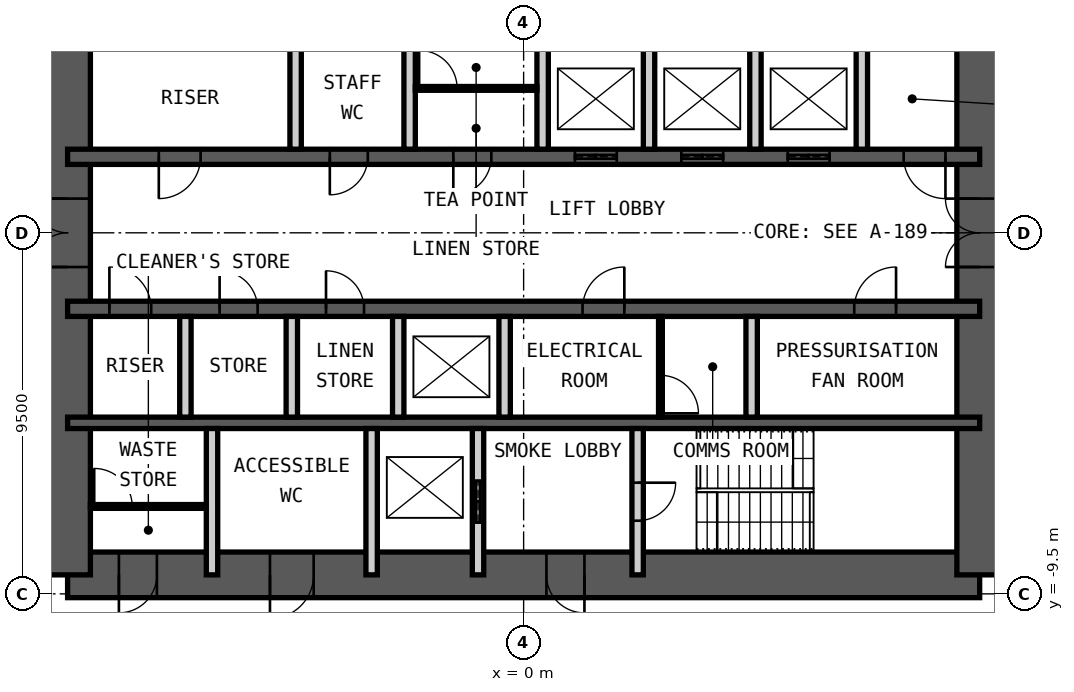
"""IFC4 building model, lengths in metres.
Left out: names, types, materials, properties, quantities, classifications, styles, units other than length and angle.
Written with IfcOpenShell. Run it as: python <this file> out.ifc"""

import sys

from ifc_helpers import new_model, si_unit, direction, frame, frame_2d, origin, place, context, subcontext, project, spatial, rectangle, extrude, element, fill, save


model = new_model("IFC4")
c1 = context("Model", 3, precision=1e-05, world=origin(), true_north=direction((0.0, 1.0)))
c2 = subcontext(c1, "Body", "Model", "MODEL_VIEW")
j1 = project(units=[si_unit("LENGTHUNIT", "METRE"), si_unit("PLANEANGLEUNIT", "RADIAN")], contexts=[c1])
p1 = place(None, origin())
s1 = spatial("IfcSite", under=j1, at=p1, CompositionType="ELEMENT")
p2 = place(p1, origin())
s2 = spatial("IfcBuilding", under=s1, at=p2, CompositionType="ELEMENT")
p3 = place(p2, frame((0.0, 0.0, 226.6)))
s3 = spatial("IfcBuildingStorey", under=s2, at=p3, CompositionType="ELEMENT", Elevation=226.6)
p4 = place(p3, frame((-12.0, -9.0, 0.0), z_axis=(0.0, 0.0, 1.0), x_axis=(1.0, 0.0, 0.0)))
e1 = element("IfcWall", 1, at=p4, inside=s3, PredefinedType="SHEAR", context=c2, shape_type="SweptSolid", body=[
    extrude(rectangle(XDim=24.0, YDim=1.2, at=frame_2d((12.0, 0.0))), origin(), (0.0, 0.0, 1.0), 4.2),
])
p5 = place(p4, frame((1.35, 0.0, 0.0)))
e2 = element("IfcOpeningElement", 2, at=p5, cuts=e1, PredefinedType="OPENING", context=c2, shape_type="SweptSolid", body=[
    extrude(rectangle(XDim=1.0, YDim=2.1, at=frame_2d((0.5, 1.05))), frame((0.0, 0.61, 0.0), z_axis=(0.0, -1.0, 0.0), x_axis=(1.0, 0.0, 0.0)), (0.0, 0.0, 1.0), 1.22),
])
p6 = place(p4, frame((5.325, 0.0, 0.0)))
e3 = element("IfcOpeningElement", 3, at=p6, cuts=e1, PredefinedType="OPENING", context=c2, shape_type="SweptSolid", body=[
    extrude(rectangle(XDim=1.15, YDim=2.1, at=frame_2d((0.575, 1.05))), frame((0.0, 0.61, 0.0), z_axis=(0.0, -1.0, 0.0), x_axis=(1.0, 0.0, 0.0)), (0.0, 0.0, 1.0), 1.22),
])
p7 = place(p4, frame((12.6, 0.0, 0.0)))
e4 = element("IfcOpeningElement", 4, at=p7, cuts=e1, PredefinedType="OPENING", context=c2, shape_type="SweptSolid", body=[
    extrude(rectangle(XDim=1.0, YDim=2.1, at=frame_2d((0.5, 1.05))), frame((0.0, 0.61, 0.0), z_axis=(0.0, -1.0, 0.0), x_axis=(1.0, 0.0, 0.0)), (0.0, 0.0, 1.0), 1.22),
])
p8 = place(p3, frame((12.0, -9.0, 0.0), z_axis=(0.0, 0.0, 1.0), x_axis=(0.0, 1.0, 0.0)))
e5 = element("IfcWall", 5, at=p8, inside=s3, PredefinedType="SHEAR", context=c2, shape_type="SweptSolid", body=[
    extrude(rectangle(XDim=18.0, YDim=1.2, at=frame_2d((9.0, 0.0))), origin(), (0.0, 0.0, 1.0), 4.2),
])
p9 = place(p8, frame((8.1, 0.0, 0.0)))
e6 = element("IfcOpeningElement", 6, at=p9, cuts=e5, PredefinedType="OPENING", context=c2, shape_type="SweptSolid", body=[
    extrude(rectangle(XDim=1.8, YDim=2.1, at=frame_2d((0.9, 1.05))), frame((0.0, 0.61, 0.0), z_axis=(0.0, -1.0, 0.0), x_axis=(1.0, 0.0, 0.0)), (0.0, 0.0, 1.0), 1.22),
])
p10 = place(p3, frame((-12.0, -9.0, 0.0), z_axis=(0.0, 0.0, 1.0), x_axis=(0.0, 1.0, 0.0)))
e7 = element("IfcWall", 7, at=p10, inside=s3, PredefinedType="SHEAR", context=c2, shape_type="SweptSolid", body=[
    extrude(rectangle(XDim=18.0, YDim=1.2, at=frame_2d((9.0, 0.0))), origin(), (0.0, 0.0, 1.0), 4.2),
])
p11 = place(p10, frame((8.1, 0.0, 0.0)))
e8 = element("IfcOpeningElement", 8, at=p11, cuts=e7, PredefinedType="OPENING", context=c2, shape_type="SweptSolid", body=[
    extrude(rectangle(XDim=1.8, YDim=2.1, at=frame_2d((0.9, 1.05))), frame((0.0, 0.61, 0.0), z_axis=(0.0, -1.0, 0.0), x_axis=(1.0, 0.0, 0.0)), (0.0, 0.0, 1.0), 1.22),
])
p12 = place(p3, frame((-12.0, 2.0, 0.0), z_axis=(0.0, 0.0, 1.0), x_axis=(1.0, 0.0, 0.0)))
e9 = element("IfcWall", 9, at=p12, inside=s3, PredefinedType="SHEAR", context=c2, shape_type="SweptSolid", body=[
    extrude(rectangle(XDim=24.0, YDim=0.4, at=frame_2d((12.0, 0.0))), origin(), (0.0, 0.0, 1.0), 4.2),
])
p13 = place(p12, frame((2.4, 0.0, 0.0)))
e10 = element("IfcOpeningElement", 10, at=p13, cuts=e9, PredefinedType="OPENING", context=c2, shape_type="SweptSolid", body=[
    extrude(rectangle(XDim=1.1, YDim=2.1, at=frame_2d((0.55, 1.05))), frame((0.0, 0.21, 0.0), z_axis=(0.0, -1.0, 0.0), x_axis=(1.0, 0.0, 0.0)), (0.0, 0.0, 1.0), 0.42),
])
p14 = place(p12, frame((22.0, 0.0, 0.0)))
e11 = element("IfcOpeningElement", 11, at=p14, cuts=e9, PredefinedType="OPENING", context=c2, shape_type="SweptSolid", body=[
    extrude(rectangle(XDim=1.1, YDim=2.1, at=frame_2d((0.55, 1.05))), frame((0.0, 0.21, 0.0), z_axis=(0.0, -1.0, 0.0), x_axis=(1.0, 0.0, 0.0)), (0.0, 0.0, 1.0), 0.42),
])
p15 = place(p12, frame((10.15, 0.0, 0.0)))
e12 = element("IfcOpeningElement", 12, at=p15, cuts=e9, PredefinedType="OPENING", context=c2, shape_type="SweptSolid", body=[
    extrude(rectangle(XDim=1.0, YDim=2.1, at=frame_2d((0.5, 1.05))), frame((0.0, 0.21, 0.0), z_axis=(0.0, -1.0, 0.0), x_axis=(1.0, 0.0, 0.0)), (0.0, 0.0, 1.0), 0.42),
])
p16 = place(p12, frame((6.9, 0.0, 0.0)))
e13 = element("IfcOpeningElement", 13, at=p16, cuts=e9, PredefinedType="OPENING", context=c2, shape_type="SweptSolid", body=[
    extrude(rectangle(XDim=1.0, YDim=2.1, at=frame_2d((0.5, 1.05))), frame((0.0, 0.21, 0.0), z_axis=(0.0, -1.0, 0.0), x_axis=(1.0, 0.0, 0.0)), (0.0, 0.0, 1.0), 0.42),
])
p17 = place(p12, frame((13.35, 0.0, 0.0)))
e14 = element("IfcOpeningElement", 14, at=p17, cuts=e9, PredefinedType="OPENING", context=c2, shape_type="SweptSolid", body=[
    extrude(rectangle(XDim=1.1, YDim=2.4, at=frame_2d((0.55, 1.2))), frame((0.0, 0.21, 0.0), z_axis=(0.0, -1.0, 0.0), x_axis=(1.0, 0.0, 0.0)), (0.0, 0.0, 1.0), 0.42),
])
p18 = place(p12, frame((16.15, 0.0, 0.0)))
e15 = element("IfcOpeningElement", 15, at=p18, cuts=e9, PredefinedType="OPENING", context=c2, shape_type="SweptSolid", body=[
    extrude(rectangle(XDim=1.1, YDim=2.4, at=frame_2d((0.55, 1.2))), frame((0.0, 0.21, 0.0), z_axis=(0.0, -1.0, 0.0), x_axis=(1.0, 0.0, 0.0)), (0.0, 0.0, 1.0), 0.42),
])
p19 = place(p12, frame((18.95, 0.0, 0.0)))
e16 = element("IfcOpeningElement", 16, at=p19, cuts=e9, PredefinedType="OPENING", context=c2, shape_type="SweptSolid", body=[
    extrude(rectangle(XDim=1.1, YDim=2.4, at=frame_2d((0.55, 1.2))), frame((0.0, 0.21, 0.0), z_axis=(0.0, -1.0, 0.0), x_axis=(1.0, 0.0, 0.0)), (0.0, 0.0, 1.0), 0.42),
])
p20 = place(p3, frame((-12.0, -2.0, 0.0), z_axis=(0.0, 0.0, 1.0), x_axis=(1.0, 0.0, 0.0)))
e17 = element("IfcWall", 17, at=p20, inside=s3, PredefinedType="SHEAR", context=c2, shape_type="SweptSolid", body=[
    extrude(rectangle(XDim=24.0, YDim=0.4, at=frame_2d((12.0, 0.0))), origin(), (0.0, 0.0, 1.0), 4.2),
])
p21 = place(p20, frame((1.1, 0.0, 0.0)))
e18 = element("IfcOpeningElement", 18, at=p21, cuts=e17, PredefinedType="OPENING", context=c2, shape_type="SweptSolid", body=[
    extrude(rectangle(XDim=1.1, YDim=2.1, at=frame_2d((0.55, 1.05))), frame((0.0, 0.21, 0.0), z_axis=(0.0, -1.0, 0.0), x_axis=(1.0, 0.0, 0.0)), (0.0, 0.0, 1.0), 0.42),
])
p22 = place(p20, frame((13.55, 0.0, 0.0)))
e19 = element("IfcOpeningElement", 19, at=p22, cuts=e17, PredefinedType="OPENING", context=c2, shape_type="SweptSolid", body=[
    extrude(rectangle(XDim=1.1, YDim=2.1, at=frame_2d((0.55, 1.05))), frame((0.0, 0.21, 0.0), z_axis=(0.0, -1.0, 0.0), x_axis=(1.0, 0.0, 0.0)), (0.0, 0.0, 1.0), 0.42),
])
p23 = place(p20, frame((20.7, 0.0, 0.0)))
e20 = element("IfcOpeningElement", 20, at=p23, cuts=e17, PredefinedType="OPENING", context=c2, shape_type="SweptSolid", body=[
    extrude(rectangle(XDim=1.1, YDim=2.1, at=frame_2d((0.55, 1.05))), frame((0.0, 0.21, 0.0), z_axis=(0.0, -1.0, 0.0), x_axis=(1.0, 0.0, 0.0)), (0.0, 0.0, 1.0), 0.42),
])
p24 = place(p20, frame((4.0, 0.0, 0.0)))
e21 = element("IfcOpeningElement", 21, at=p24, cuts=e17, PredefinedType="OPENING", context=c2, shape_type="SweptSolid", body=[
    extrude(rectangle(XDim=1.0, YDim=2.1, at=frame_2d((0.5, 1.05))), frame((0.0, 0.21, 0.0), z_axis=(0.0, -1.0, 0.0), x_axis=(1.0, 0.0, 0.0)), (0.0, 0.0, 1.0), 0.42),
])
p25 = place(p20, frame((6.8, 0.0, 0.0)))
e22 = element("IfcOpeningElement", 22, at=p25, cuts=e17, PredefinedType="OPENING", context=c2, shape_type="SweptSolid", body=[
    extrude(rectangle(XDim=1.0, YDim=2.1, at=frame_2d((0.5, 1.05))), frame((0.0, 0.21, 0.0), z_axis=(0.0, -1.0, 0.0), x_axis=(1.0, 0.0, 0.0)), (0.0, 0.0, 1.0), 0.42),
])
p26 = place(p3, frame((-12.0, -5.0, 0.0), z_axis=(0.0, 0.0, 1.0), x_axis=(1.0, 0.0, 0.0)))
e23 = element("IfcWall", 23, at=p26, inside=s3, PredefinedType="SHEAR", context=c2, shape_type="SweptSolid", body=[
    extrude(rectangle(XDim=24.0, YDim=0.3, at=frame_2d((12.0, 0.0))), origin(), (0.0, 0.0, 1.0), 4.2),
])
for number, where, z_axis, x_axis in (
    (24, (-6.0, 2.2, 0.0), (0.0, 0.0, 1.0), (0.0, 1.0, 0.0)),
    (25, (-3.0, 2.2, 0.0), (0.0, 0.0, 1.0), (0.0, 1.0, 0.0)),
    (26, (0.5, 2.2, 0.0), (0.0, 0.0, 1.0), (0.0, 1.0, 0.0)),
    (27, (3.3, 2.2, 0.0), (0.0, 0.0, 1.0), (0.0, 1.0, 0.0)),
    (28, (6.1, 2.2, 0.0), (0.0, 0.0, 1.0), (0.0, 1.0, 0.0)),
    (29, (8.9, 2.2, 0.0), (0.0, 0.0, 1.0), (0.0, 1.0, 0.0)),
    (30, (-8.9, -4.85, 0.0), (0.0, 0.0, 1.0), (0.0, 1.0, 0.0)),
    (31, (-6.1, -4.85, 0.0), (0.0, 0.0, 1.0), (0.0, 1.0, 0.0)),
    (32, (-3.3, -4.85, 0.0), (0.0, 0.0, 1.0), (0.0, 1.0, 0.0)),
    (33, (-0.5, -4.85, 0.0), (0.0, 0.0, 1.0), (0.0, 1.0, 0.0)),
    (34, (6.0, -4.85, 0.0), (0.0, 0.0, 1.0), (0.0, 1.0, 0.0)),
):
    element("IfcWall", number, at=place(p3, frame(where, z_axis=z_axis, x_axis=x_axis)), inside=s3, PredefinedType="PARTITIONING", context=c2, shape_type="SweptSolid", body=[
        extrude(rectangle(XDim=2.65, YDim=0.3, at=frame_2d((1.325, 0.0))), origin(), (0.0, 0.0, 1.0), 3.98),
    ])
for number, where, z_axis, x_axis in (
    (35, (-8.2, -9.0, 0.0), (0.0, 0.0, 1.0), (0.0, 1.0, 0.0)),
    (36, (-4.0, -9.0, 0.0), (0.0, 0.0, 1.0), (0.0, 1.0, 0.0)),
):
    element("IfcWall", number, at=place(p3, frame(where, z_axis=z_axis, x_axis=x_axis)), inside=s3, PredefinedType="PARTITIONING", context=c2, shape_type="SweptSolid", body=[
        extrude(rectangle(XDim=3.85, YDim=0.3, at=frame_2d((1.925, 0.0))), origin(), (0.0, 0.0, 1.0), 3.98),
    ])
p27 = place(p3, frame((-1.2, -9.0, 0.0), z_axis=(0.0, 0.0, 1.0), x_axis=(0.0, 1.0, 0.0)))
e37 = element("IfcWall", 37, at=p27, inside=s3, PredefinedType="PARTITIONING", context=c2, shape_type="SweptSolid", body=[
    extrude(rectangle(XDim=3.85, YDim=0.3, at=frame_2d((1.925, 0.0))), origin(), (0.0, 0.0, 1.0), 3.98),
])
p28 = place(p27, frame((1.375, 0.0, 0.0)))
e38 = element("IfcOpeningElement", 38, at=p28, cuts=e37, PredefinedType="OPENING", context=c2, shape_type="SweptSolid", body=[
    extrude(rectangle(XDim=1.1, YDim=2.4, at=frame_2d((0.55, 1.2))), frame((0.0, 0.16, 0.0), z_axis=(0.0, -1.0, 0.0), x_axis=(1.0, 0.0, 0.0)), (0.0, 0.0, 1.0), 0.32),
])
p29 = place(p3, frame((3.0, -9.0, 0.0), z_axis=(0.0, 0.0, 1.0), x_axis=(0.0, 1.0, 0.0)))
e39 = element("IfcWall", 39, at=p29, inside=s3, PredefinedType="PARTITIONING", context=c2, shape_type="SweptSolid", body=[
    extrude(rectangle(XDim=3.85, YDim=0.3, at=frame_2d((1.925, 0.0))), origin(), (0.0, 0.0, 1.0), 3.98),
])
p30 = place(p29, frame((1.425, 0.0, 0.0)))
e40 = element("IfcOpeningElement", 40, at=p30, cuts=e39, PredefinedType="OPENING", context=c2, shape_type="SweptSolid", body=[
    extrude(rectangle(XDim=1.0, YDim=2.1, at=frame_2d((0.5, 1.05))), frame((0.0, 0.16, 0.0), z_axis=(0.0, -1.0, 0.0), x_axis=(1.0, 0.0, 0.0)), (0.0, 0.0, 1.0), 0.32),
])
p31 = place(p3, frame((-2.85, 3.8, 0.0), z_axis=(0.0, 0.0, 1.0), x_axis=(1.0, 0.0, 0.0)))
e41 = element("IfcWall", 41, at=p31, inside=s3, PredefinedType="PARTITIONING", context=c2, shape_type="SweptSolid", body=[
    extrude(rectangle(XDim=3.2, YDim=0.1, at=frame_2d((1.6, 0.0))), origin(), (0.0, 0.0, 1.0), 3.98),
])
p32 = place(p31, frame((0.1, 0.0, 0.0)))
e42 = element("IfcOpeningElement", 42, at=p32, cuts=e41, PredefinedType="OPENING", context=c2, shape_type="SweptSolid", body=[
    extrude(rectangle(XDim=1.0, YDim=2.4, at=frame_2d((0.5, 1.2))), frame((0.0, 0.06, 0.0), z_axis=(0.0, -1.0, 0.0), x_axis=(1.0, 0.0, 0.0)), (0.0, 0.0, 1.0), 0.12),
])
p33 = place(p3, frame((3.6, -4.85, 0.0), z_axis=(0.0, 0.0, 1.0), x_axis=(0.0, 1.0, 0.0)))
e43 = element("IfcWall", 43, at=p33, inside=s3, PredefinedType="PARTITIONING", context=c2, shape_type="SweptSolid", body=[
    extrude(rectangle(XDim=2.65, YDim=0.1, at=frame_2d((1.325, 0.0))), origin(), (0.0, 0.0, 1.0), 3.98),
])
p34 = place(p33, frame((0.1, 0.0, 0.0)))
e44 = element("IfcOpeningElement", 44, at=p34, cuts=e43, PredefinedType="OPENING", context=c2, shape_type="SweptSolid", body=[
    extrude(rectangle(XDim=1.0, YDim=2.4, at=frame_2d((0.5, 1.2))), frame((0.0, 0.06, 0.0), z_axis=(0.0, -1.0, 0.0), x_axis=(1.0, 0.0, 0.0)), (0.0, 0.0, 1.0), 0.12),
])
p35 = place(p3, frame((-11.4, -7.2, 0.0), z_axis=(0.0, 0.0, 1.0), x_axis=(1.0, 0.0, 0.0)))
e45 = element("IfcWall", 45, at=p35, inside=s3, PredefinedType="PARTITIONING", context=c2, shape_type="SweptSolid", body=[
    extrude(rectangle(XDim=3.05, YDim=0.1, at=frame_2d((1.525, 0.0))), origin(), (0.0, 0.0, 1.0), 3.98),
])
p36 = place(p35, frame((0.1, 0.0, 0.0)))
e46 = element("IfcOpeningElement", 46, at=p36, cuts=e45, PredefinedType="OPENING", context=c2, shape_type="SweptSolid", body=[
    extrude(rectangle(XDim=1.0, YDim=2.4, at=frame_2d((0.5, 1.2))), frame((0.0, 0.06, 0.0), z_axis=(0.0, -1.0, 0.0), x_axis=(1.0, 0.0, 0.0)), (0.0, 0.0, 1.0), 0.12),
])
p37 = place(p5, origin())
e47 = element("IfcDoor", 47, at=p37, inside=s3, OperationType="SINGLE_SWING_LEFT", PredefinedType="DOOR", context=c2, shape_type="SweptSolid", body=[
    extrude(rectangle(XDim=1.0, YDim=2.1, at=frame_2d((0.5, 1.05))), frame((0.0, 0.025, 0.0), z_axis=(0.0, -1.0, 0.0), x_axis=(1.0, 0.0, 0.0)), (0.0, 0.0, 1.0), 0.05),
])
fill(e2, e47)
p38 = place(p6, origin())
e48 = element("IfcDoor", 48, at=p38, inside=s3, OperationType="SINGLE_SWING_LEFT", PredefinedType="DOOR", context=c2, shape_type="SweptSolid", body=[
    extrude(rectangle(XDim=1.15, YDim=2.1, at=frame_2d((0.575, 1.05))), frame((0.0, 0.025, 0.0), z_axis=(0.0, -1.0, 0.0), x_axis=(1.0, 0.0, 0.0)), (0.0, 0.0, 1.0), 0.05),
])
fill(e3, e48)
p39 = place(p7, origin())
e49 = element("IfcDoor", 49, at=p39, inside=s3, OperationType="SINGLE_SWING_RIGHT", PredefinedType="DOOR", context=c2, shape_type="SweptSolid", body=[
    extrude(rectangle(XDim=1.0, YDim=2.1, at=frame_2d((0.5, 1.05))), frame((0.0, 0.025, 0.0), z_axis=(0.0, -1.0, 0.0), x_axis=(1.0, 0.0, 0.0)), (0.0, 0.0, 1.0), 0.05),
])
fill(e4, e49)
p40 = place(p30, origin())
e50 = element("IfcDoor", 50, at=p40, inside=s3, OperationType="SINGLE_SWING_RIGHT", PredefinedType="DOOR", context=c2, shape_type="SweptSolid", body=[
    extrude(rectangle(XDim=1.0, YDim=2.1, at=frame_2d((0.5, 1.05))), frame((0.0, 0.025, 0.0), z_axis=(0.0, -1.0, 0.0), x_axis=(1.0, 0.0, 0.0)), (0.0, 0.0, 1.0), 0.05),
])
fill(e40, e50)
p41 = place(p13, origin())
e51 = element("IfcDoor", 51, at=p41, inside=s3, OperationType="SINGLE_SWING_LEFT", PredefinedType="DOOR", context=c2, shape_type="SweptSolid", body=[
    extrude(rectangle(XDim=1.1, YDim=2.1, at=frame_2d((0.55, 1.05))), frame((0.0, 0.025, 0.0), z_axis=(0.0, -1.0, 0.0), x_axis=(1.0, 0.0, 0.0)), (0.0, 0.0, 1.0), 0.05),
])
fill(e10, e51)
p42 = place(p21, origin())
e52 = element("IfcDoor", 52, at=p42, inside=s3, OperationType="SINGLE_SWING_RIGHT", PredefinedType="DOOR", context=c2, shape_type="SweptSolid", body=[
    extrude(rectangle(XDim=1.1, YDim=2.1, at=frame_2d((0.55, 1.05))), frame((0.0, 0.025, 0.0), z_axis=(0.0, -1.0, 0.0), x_axis=(1.0, 0.0, 0.0)), (0.0, 0.0, 1.0), 0.05),
])
fill(e18, e52)
p43 = place(p14, origin())
e53 = element("IfcDoor", 53, at=p43, inside=s3, OperationType="SINGLE_SWING_RIGHT", PredefinedType="DOOR", context=c2, shape_type="SweptSolid", body=[
    extrude(rectangle(XDim=1.1, YDim=2.1, at=frame_2d((0.55, 1.05))), frame((0.0, 0.025, 0.0), z_axis=(0.0, -1.0, 0.0), x_axis=(1.0, 0.0, 0.0)), (0.0, 0.0, 1.0), 0.05),
])
fill(e11, e53)
p44 = place(p15, origin())
e54 = element("IfcDoor", 54, at=p44, inside=s3, OperationType="SINGLE_SWING_LEFT", PredefinedType="DOOR", context=c2, shape_type="SweptSolid", body=[
    extrude(rectangle(XDim=1.0, YDim=2.1, at=frame_2d((0.5, 1.05))), frame((0.0, 0.025, 0.0), z_axis=(0.0, -1.0, 0.0), x_axis=(1.0, 0.0, 0.0)), (0.0, 0.0, 1.0), 0.05),
])
fill(e12, e54)
p45 = place(p22, origin())
e55 = element("IfcDoor", 55, at=p45, inside=s3, OperationType="SINGLE_SWING_LEFT", PredefinedType="DOOR", context=c2, shape_type="SweptSolid", body=[
    extrude(rectangle(XDim=1.1, YDim=2.1, at=frame_2d((0.55, 1.05))), frame((0.0, 0.025, 0.0), z_axis=(0.0, -1.0, 0.0), x_axis=(1.0, 0.0, 0.0)), (0.0, 0.0, 1.0), 0.05),
])
fill(e19, e55)
p46 = place(p23, origin())
e56 = element("IfcDoor", 56, at=p46, inside=s3, OperationType="SINGLE_SWING_LEFT", PredefinedType="DOOR", context=c2, shape_type="SweptSolid", body=[
    extrude(rectangle(XDim=1.1, YDim=2.1, at=frame_2d((0.55, 1.05))), frame((0.0, 0.025, 0.0), z_axis=(0.0, -1.0, 0.0), x_axis=(1.0, 0.0, 0.0)), (0.0, 0.0, 1.0), 0.05),
])
fill(e20, e56)
p47 = place(p9, origin())
e57 = element("IfcDoor", 57, at=p47, inside=s3, OperationType="DOUBLE_DOOR_DOUBLE_SWING", PredefinedType="DOOR", context=c2, shape_type="SweptSolid", body=[
    extrude(rectangle(XDim=1.8, YDim=2.1, at=frame_2d((0.9, 1.05))), frame((0.0, 0.025, 0.0), z_axis=(0.0, -1.0, 0.0), x_axis=(1.0, 0.0, 0.0)), (0.0, 0.0, 1.0), 0.05),
])
fill(e6, e57)
p48 = place(p11, origin())
e58 = element("IfcDoor", 58, at=p48, inside=s3, OperationType="DOUBLE_DOOR_DOUBLE_SWING", PredefinedType="DOOR", context=c2, shape_type="SweptSolid", body=[
    extrude(rectangle(XDim=1.8, YDim=2.1, at=frame_2d((0.9, 1.05))), frame((0.0, 0.025, 0.0), z_axis=(0.0, -1.0, 0.0), x_axis=(1.0, 0.0, 0.0)), (0.0, 0.0, 1.0), 0.05),
])
fill(e8, e58)
p49 = place(p28, origin())
e59 = element("IfcDoor", 59, at=p49, inside=s3, OperationType="DOUBLE_DOOR_SLIDING", PredefinedType="DOOR", context=c2, shape_type="SweptSolid", body=[
    extrude(rectangle(XDim=1.1, YDim=2.4, at=frame_2d((0.55, 1.2))), frame((0.0, 0.025, 0.0), z_axis=(0.0, -1.0, 0.0), x_axis=(1.0, 0.0, 0.0)), (0.0, 0.0, 1.0), 0.05),
])
fill(e38, e59)
p50 = place(p16, origin())
e60 = element("IfcDoor", 60, at=p50, inside=s3, OperationType="SINGLE_SWING_LEFT", PredefinedType="DOOR", context=c2, shape_type="SweptSolid", body=[
    extrude(rectangle(XDim=1.0, YDim=2.1, at=frame_2d((0.5, 1.05))), frame((0.0, 0.025, 0.0), z_axis=(0.0, -1.0, 0.0), x_axis=(1.0, 0.0, 0.0)), (0.0, 0.0, 1.0), 0.05),
])
fill(e13, e60)
p51 = place(p17, origin())
e61 = element("IfcDoor", 61, at=p51, inside=s3, OperationType="DOUBLE_DOOR_SLIDING", PredefinedType="DOOR", context=c2, shape_type="SweptSolid", body=[
    extrude(rectangle(XDim=1.1, YDim=2.4, at=frame_2d((0.55, 1.2))), frame((0.0, 0.025, 0.0), z_axis=(0.0, -1.0, 0.0), x_axis=(1.0, 0.0, 0.0)), (0.0, 0.0, 1.0), 0.05),
])
fill(e14, e61)
p52 = place(p18, origin())
e62 = element("IfcDoor", 62, at=p52, inside=s3, OperationType="DOUBLE_DOOR_SLIDING", PredefinedType="DOOR", context=c2, shape_type="SweptSolid", body=[
    extrude(rectangle(XDim=1.1, YDim=2.4, at=frame_2d((0.55, 1.2))), frame((0.0, 0.025, 0.0), z_axis=(0.0, -1.0, 0.0), x_axis=(1.0, 0.0, 0.0)), (0.0, 0.0, 1.0), 0.05),
])
fill(e15, e62)
p53 = place(p19, origin())
e63 = element("IfcDoor", 63, at=p53, inside=s3, OperationType="DOUBLE_DOOR_SLIDING", PredefinedType="DOOR", context=c2, shape_type="SweptSolid", body=[
    extrude(rectangle(XDim=1.1, YDim=2.4, at=frame_2d((0.55, 1.2))), frame((0.0, 0.025, 0.0), z_axis=(0.0, -1.0, 0.0), x_axis=(1.0, 0.0, 0.0)), (0.0, 0.0, 1.0), 0.05),
])
fill(e16, e63)
p54 = place(p24, origin())
e64 = element("IfcDoor", 64, at=p54, inside=s3, OperationType="SINGLE_SWING_RIGHT", PredefinedType="DOOR", context=c2, shape_type="SweptSolid", body=[
    extrude(rectangle(XDim=1.0, YDim=2.1, at=frame_2d((0.5, 1.05))), frame((0.0, 0.025, 0.0), z_axis=(0.0, -1.0, 0.0), x_axis=(1.0, 0.0, 0.0)), (0.0, 0.0, 1.0), 0.05),
])
fill(e21, e64)
p55 = place(p25, origin())
e65 = element("IfcDoor", 65, at=p55, inside=s3, OperationType="SINGLE_SWING_RIGHT", PredefinedType="DOOR", context=c2, shape_type="SweptSolid", body=[
    extrude(rectangle(XDim=1.0, YDim=2.1, at=frame_2d((0.5, 1.05))), frame((0.0, 0.025, 0.0), z_axis=(0.0, -1.0, 0.0), x_axis=(1.0, 0.0, 0.0)), (0.0, 0.0, 1.0), 0.05),
])
fill(e22, e65)
p56 = place(p32, origin())
e66 = element("IfcDoor", 66, at=p56, inside=s3, OperationType="SINGLE_SWING_RIGHT", PredefinedType="DOOR", context=c2, shape_type="SweptSolid", body=[
    extrude(rectangle(XDim=1.0, YDim=2.4, at=frame_2d((0.5, 1.2))), frame((0.0, 0.025, 0.0), z_axis=(0.0, -1.0, 0.0), x_axis=(1.0, 0.0, 0.0)), (0.0, 0.0, 1.0), 0.05),
])
fill(e42, e66)
p57 = place(p34, origin())
e67 = element("IfcDoor", 67, at=p57, inside=s3, OperationType="SINGLE_SWING_LEFT", PredefinedType="DOOR", context=c2, shape_type="SweptSolid", body=[
    extrude(rectangle(XDim=1.0, YDim=2.4, at=frame_2d((0.5, 1.2))), frame((0.0, 0.025, 0.0), z_axis=(0.0, -1.0, 0.0), x_axis=(1.0, 0.0, 0.0)), (0.0, 0.0, 1.0), 0.05),
])
fill(e44, e67)
p58 = place(p36, origin())
e68 = element("IfcDoor", 68, at=p58, inside=s3, OperationType="SINGLE_SWING_RIGHT", PredefinedType="DOOR", context=c2, shape_type="SweptSolid", body=[
    extrude(rectangle(XDim=1.0, YDim=2.4, at=frame_2d((0.5, 1.2))), frame((0.0, 0.025, 0.0), z_axis=(0.0, -1.0, 0.0), x_axis=(1.0, 0.0, 0.0)), (0.0, 0.0, 1.0), 0.05),
])
fill(e46, e68)
save(model, sys.argv[1])
